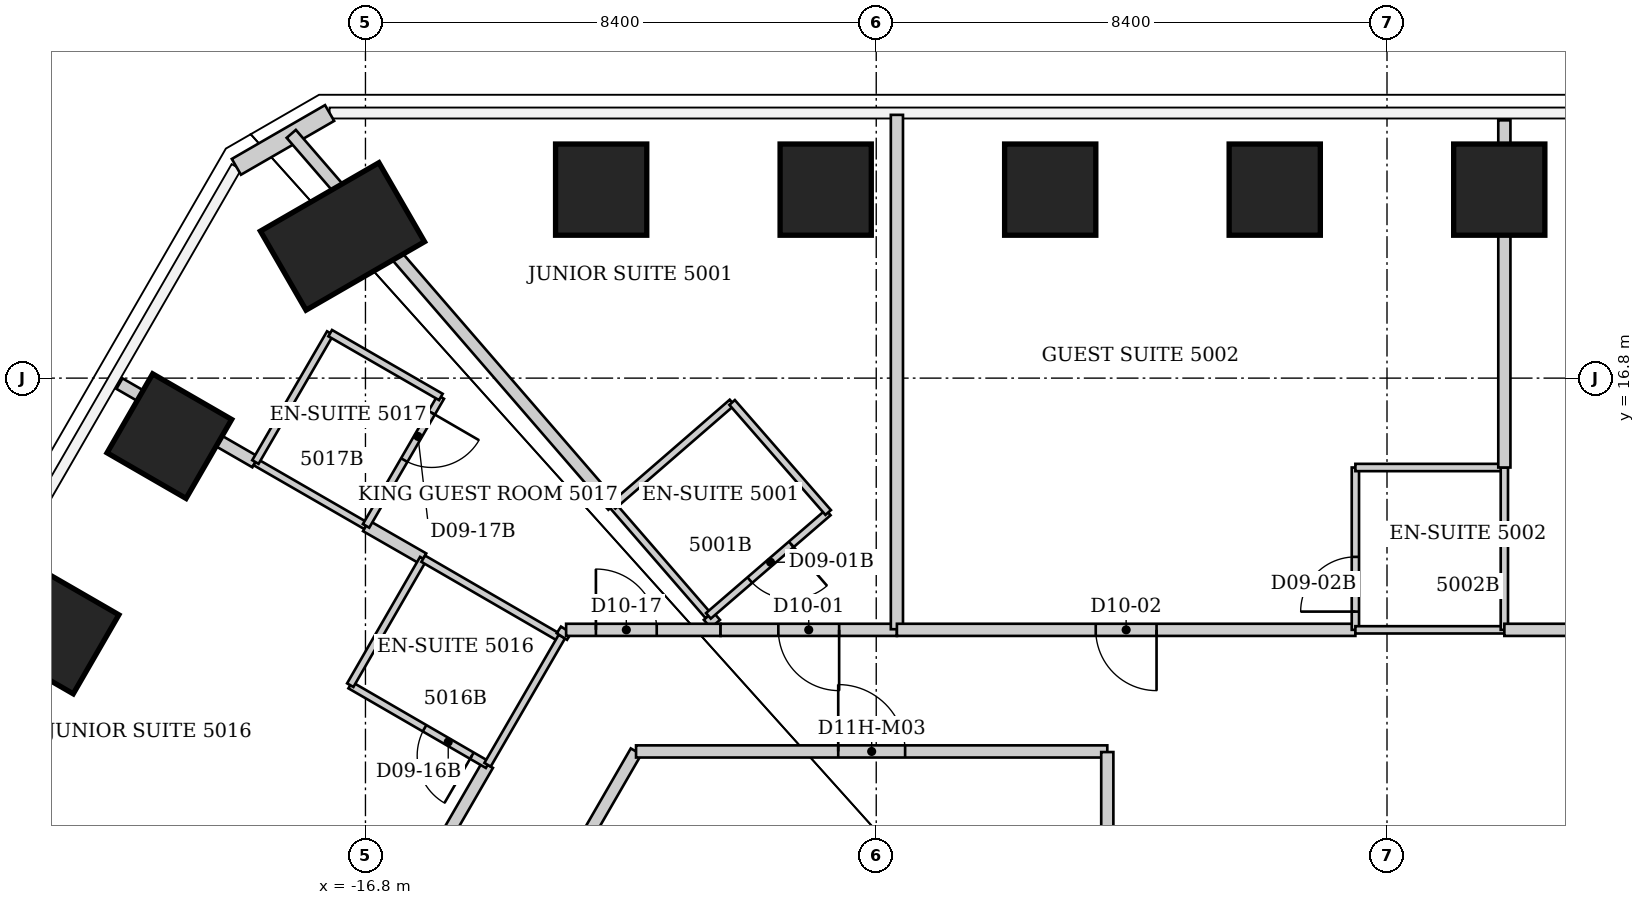
"""IFC4 building model, lengths in metres.
Left out: names, types, materials, properties, quantities, classifications, styles, units other than length and angle.
Written with IfcOpenShell. Run it as: python <this file> out.ifc"""

import sys

from ifc_helpers import new_model, si_unit, direction, frame, frame_2d, origin, origin_2d, place, context, subcontext, project, spatial, rectangle, extrude, element, fill, save


model = new_model("IFC4")
c1 = context("Model", 3, precision=1e-05, world=origin(), true_north=direction((0.0, 1.0)))
c2 = subcontext(c1, "Body", "Model", "MODEL_VIEW")
j1 = project(units=[si_unit("LENGTHUNIT", "METRE"), si_unit("PLANEANGLEUNIT", "RADIAN")], contexts=[c1])
p1 = place(None, origin())
s1 = spatial("IfcSite", under=j1, at=p1, CompositionType="ELEMENT")
p2 = place(p1, origin())
s2 = spatial("IfcBuilding", under=s1, at=p2, CompositionType="ELEMENT")
p3 = place(p2, frame((0.0, 0.0, 202.2)))
s3 = spatial("IfcBuildingStorey", under=s2, at=p3, CompositionType="ELEMENT", Elevation=202.2)
for number, where, z_axis, x_axis in (
    (1, (-12.924, 19.9, 0.0), (0.0, 0.0, 1.0), (0.0, 1.0, 0.0)),
    (2, (-9.231, 19.9, 0.0), (0.0, 0.0, 1.0), (0.0, 1.0, 0.0)),
    (3, (-5.539, 19.9, 0.0), (0.0, 0.0, 1.0), (0.0, 1.0, 0.0)),
    (4, (-1.846, 19.9, 0.0), (0.0, 0.0, 1.0), (0.0, 1.0, 0.0)),
    (5, (1.846, 19.9, 0.0), (0.0, 0.0, 1.0), (0.0, 1.0, 0.0)),
    (6, (-21.88, 12.633, 0.0), (0.0, 0.0, 1.0), (-0.866, 0.5, 0.0)),
    (7, (-20.025, 15.846, 0.0), (0.0, 0.0, 1.0), (-0.866, 0.5, 0.0)),
):
    element("IfcColumn", number, at=place(p3, frame(where, z_axis=z_axis, x_axis=x_axis)), inside=s3, PredefinedType="COLUMN", context=c2, shape_type="SweptSolid", body=[
        extrude(rectangle(XDim=1.5, YDim=1.5, at=origin_2d()), origin(), (0.0, 0.0, 1.0), 3.8),
    ])
p4 = place(p3, frame((-17.178, 19.131, 0.0), z_axis=(0.0, 0.0, 1.0), x_axis=(-0.5, 0.866025403784, 0.0)))
e8 = element("IfcColumn", 8, at=p4, inside=s3, PredefinedType="COLUMN", context=c2, shape_type="SweptSolid", body=[
    extrude(rectangle(XDim=1.5, YDim=2.25, at=origin_2d()), origin(), (0.0, 0.0, 1.0), 3.8),
])
p5 = place(p3, frame((-18.923, 20.275, 0.0), z_axis=(0.0, 0.0, 1.0), x_axis=(0.866036293601, 0.499981137809, 0.0)))
e9 = element("IfcWall", 9, at=p5, inside=s3, PredefinedType="SOLIDWALL", context=c2, shape_type="SweptSolid", body=[
    extrude(rectangle(XDim=1.77, YDim=0.3, at=frame_2d((0.885, 0.0))), origin(), (0.0, 0.0, 1.0), 3.64),
])
p6 = place(p3, frame((-20.846, 16.71, 0.0), z_axis=(0.0, 0.0, 1.0), x_axis=(0.866163541035, -0.499760662899, 0.0)))
e10 = element("IfcWall", 10, at=p6, inside=s3, PredefinedType="PARTITIONING", context=c2, shape_type="SweptSolid", body=[
    extrude(rectangle(XDim=2.581, YDim=0.2, at=frame_2d((1.291, 0.0))), origin(), (0.0, 0.0, 1.0), 3.64),
])
p7 = place(p3, frame((-18.61, 15.42, 0.0), z_axis=(0.0, 0.0, 1.0), x_axis=(0.86618365172, -0.499725806311, 0.0)))
e11 = element("IfcWall", 11, at=p7, inside=s3, PredefinedType="PARTITIONING", context=c2, shape_type="SweptSolid", body=[
    extrude(rectangle(XDim=2.101, YDim=0.12, at=frame_2d((1.051, 0.0))), origin(), (0.0, 0.0, 1.0), 3.64),
])
p8 = place(p3, frame((-18.02, 20.817, 0.0), z_axis=(0.0, 0.0, 1.0), x_axis=(0.654118793629, -0.756391832201, 0.0)))
e12 = element("IfcWall", 12, at=p8, inside=s3, PredefinedType="PARTITIONING", context=c2, shape_type="SweptSolid", body=[
    extrude(rectangle(XDim=8.088, YDim=0.2, at=frame_2d((4.044, 0.0))), origin(), (0.0, 0.0, 1.0), 3.64),
])
p9 = place(p3, frame((-17.64, 5.51, 0.0), z_axis=(0.0, 0.0, 1.0), x_axis=(0.500468304441, 0.865754859212, 0.0)))
e13 = element("IfcWall", 13, at=p9, inside=s3, PredefinedType="PARTITIONING", context=c2, shape_type="SweptSolid", body=[
    extrude(rectangle(XDim=5.694, YDim=0.2, at=frame_2d((2.847, 0.0))), origin(), (0.0, 0.0, 1.0), 3.64),
])
p10 = place(p9, frame((2.347, 0.0, 0.0)))
e14 = element("IfcOpeningElement", 14, at=p10, cuts=e13, PredefinedType="OPENING", context=c2, shape_type="SweptSolid", body=[
    extrude(rectangle(XDim=1.0, YDim=2.13, at=frame_2d((0.5, 1.065))), frame((0.0, 0.1, 0.0), z_axis=(0.0, -1.0, 0.0), x_axis=(1.0, 0.0, 0.0)), (0.0, 0.0, 1.0), 0.2),
])
p11 = place(p3, frame((-17.38, 17.54, 0.0), z_axis=(0.0, 0.0, 1.0), x_axis=(-0.501888006485, -0.864932615264, 0.0)))
e15 = element("IfcWall", 15, at=p11, inside=s3, PredefinedType="PARTITIONING", context=c2, shape_type="SweptSolid", body=[
    extrude(rectangle(XDim=2.451, YDim=0.12, at=frame_2d((1.226, 0.0))), origin(), (0.0, 0.0, 1.0), 3.64),
])
p12 = place(p3, frame((-17.05, 11.75, 0.0), z_axis=(0.0, 0.0, 1.0), x_axis=(0.865155281359, -0.50150407689, 0.0)))
e16 = element("IfcWall", 16, at=p12, inside=s3, PredefinedType="PARTITIONING", context=c2, shape_type="SweptSolid", body=[
    extrude(rectangle(XDim=2.612, YDim=0.12, at=frame_2d((1.306, 0.0))), origin(), (0.0, 0.0, 1.0), 3.64),
])
p13 = place(p12, frame((1.412, 0.0, 0.0)))
e17 = element("IfcOpeningElement", 17, at=p13, cuts=e16, PredefinedType="OPENING", context=c2, shape_type="SweptSolid", body=[
    extrude(rectangle(XDim=0.9, YDim=2.03, at=frame_2d((0.45, 1.015))), frame((0.0, 0.06, 0.0), z_axis=(0.0, -1.0, 0.0), x_axis=(1.0, 0.0, 0.0)), (0.0, 0.0, 1.0), 0.12),
])
p14 = place(p3, frame((-16.79, 14.37, 0.0), z_axis=(0.0, 0.0, 1.0), x_axis=(0.867132442133, -0.498077632303, 0.0)))
e18 = element("IfcWall", 18, at=p14, inside=s3, PredefinedType="PARTITIONING", context=c2, shape_type="SweptSolid", body=[
    extrude(rectangle(XDim=1.084, YDim=0.2, at=frame_2d((0.542, 0.0))), origin(), (0.0, 0.0, 1.0), 3.64),
])
p15 = place(p3, frame((-16.79, 14.37, 0.0), z_axis=(0.0, 0.0, 1.0), x_axis=(0.501856726365, 0.86495076519, 0.0)))
e19 = element("IfcWall", 19, at=p15, inside=s3, PredefinedType="PARTITIONING", context=c2, shape_type="SweptSolid", body=[
    extrude(rectangle(XDim=2.451, YDim=0.12, at=frame_2d((1.226, 0.0))), origin(), (0.0, 0.0, 1.0), 3.64),
])
p16 = place(p15, frame((1.251, 0.0, 0.0)))
e20 = element("IfcOpeningElement", 20, at=p16, cuts=e19, PredefinedType="OPENING", context=c2, shape_type="SweptSolid", body=[
    extrude(rectangle(XDim=0.9, YDim=2.03, at=frame_2d((0.45, 1.015))), frame((0.0, 0.06, 0.0), z_axis=(0.0, -1.0, 0.0), x_axis=(1.0, 0.0, 0.0)), (0.0, 0.0, 1.0), 0.12),
])
p17 = place(p3, frame((-15.85, 13.83, 0.0), z_axis=(0.0, 0.0, 1.0), x_axis=(-0.499693115345, -0.866202511239, 0.0)))
e21 = element("IfcWall", 21, at=p17, inside=s3, PredefinedType="PARTITIONING", context=c2, shape_type="SweptSolid", body=[
    extrude(rectangle(XDim=2.401, YDim=0.12, at=frame_2d((1.201, 0.0))), origin(), (0.0, 0.0, 1.0), 3.64),
])
p18 = place(p3, frame((-15.85, 13.83, 0.0), z_axis=(0.0, 0.0, 1.0), x_axis=(0.865155281359, -0.50150407689, 0.0)))
e22 = element("IfcWall", 22, at=p18, inside=s3, PredefinedType="PARTITIONING", context=c2, shape_type="SweptSolid", body=[
    extrude(rectangle(XDim=2.612, YDim=0.12, at=frame_2d((1.306, 0.0))), origin(), (0.0, 0.0, 1.0), 3.64),
])
p19 = place(p3, frame((-15.56, 16.49, 0.0), z_axis=(0.0, 0.0, 1.0), x_axis=(-0.86618365172, 0.499725806311, 0.0)))
e23 = element("IfcWall", 23, at=p19, inside=s3, PredefinedType="PARTITIONING", context=c2, shape_type="SweptSolid", body=[
    extrude(rectangle(XDim=2.101, YDim=0.12, at=frame_2d((1.051, 0.0))), origin(), (0.0, 0.0, 1.0), 3.64),
])
p20 = place(p3, frame((-14.99, 6.09, 0.0), z_axis=(0.0, 0.0, 1.0), x_axis=(0.500213626659, 0.86590203124, 0.0)))
e24 = element("IfcWall", 24, at=p20, inside=s3, PredefinedType="PARTITIONING", context=c2, shape_type="SweptSolid", body=[
    extrude(rectangle(XDim=5.278, YDim=0.2, at=frame_2d((2.639, 0.0))), origin(), (0.0, 0.0, 1.0), 3.64),
])
p21 = place(p3, frame((-14.792, 10.441, 0.0), z_axis=(0.0, 0.0, 1.0), x_axis=(0.501340276177, 0.865250210912, 0.0)))
e25 = element("IfcWall", 25, at=p21, inside=s3, PredefinedType="PARTITIONING", context=c2, shape_type="SweptSolid", body=[
    extrude(rectangle(XDim=2.437, YDim=0.12, at=frame_2d((1.219, 0.0))), origin(), (0.0, 0.0, 1.0), 3.64),
])
p22 = place(p3, frame((-13.5, 12.66, 0.0), z_axis=(0.0, 0.0, 1.0), x_axis=(-0.537723852201, -0.843121022614, 0.0)))
e26 = element("IfcWall", 26, at=p22, inside=s3, PredefinedType="PARTITIONING", context=c2, shape_type="SweptSolid", body=[
    extrude(rectangle(XDim=0.13, YDim=0.2, at=frame_2d((0.065, 0.0))), origin(), (0.0, 0.0, 1.0), 3.64),
])
p23 = place(p3, frame((-12.73, 14.7, 0.0), z_axis=(0.0, 0.0, 1.0), x_axis=(0.655302876176, -0.755366229372, 0.0)))
e27 = element("IfcWall", 27, at=p23, inside=s3, PredefinedType="PARTITIONING", context=c2, shape_type="SweptSolid", body=[
    extrude(rectangle(XDim=2.396, YDim=0.12, at=frame_2d((1.198, 0.0))), origin(), (0.0, 0.0, 1.0), 3.64),
])
p24 = place(p3, frame((-12.35, 10.66, 0.0), z_axis=(0.0, 0.0, 1.0), x_axis=(1.0, 0.0, 0.0)))
e28 = element("IfcWall", 28, at=p24, inside=s3, PredefinedType="PARTITIONING", context=c2, shape_type="SweptSolid", body=[
    extrude(rectangle(XDim=7.75, YDim=0.2, at=frame_2d((3.875, 0.0))), origin(), (0.0, 0.0, 1.0), 3.64),
])
p25 = place(p24, frame((3.325, 0.0, 0.0)))
e29 = element("IfcOpeningElement", 29, at=p25, cuts=e28, PredefinedType="OPENING", context=c2, shape_type="SweptSolid", body=[
    extrude(rectangle(XDim=1.1, YDim=2.2, at=frame_2d((0.55, 1.1))), frame((0.0, 0.1, 0.0), z_axis=(0.0, -1.0, 0.0), x_axis=(1.0, 0.0, 0.0)), (0.0, 0.0, 1.0), 0.2),
])
p26 = place(p3, frame((-11.16, 12.89, 0.0), z_axis=(0.0, 0.0, 1.0), x_axis=(0.655728604214, -0.754996687155, 0.0)))
e30 = element("IfcWall", 30, at=p26, inside=s3, PredefinedType="PARTITIONING", context=c2, shape_type="SweptSolid", body=[
    extrude(rectangle(XDim=0.175, YDim=0.2, at=frame_2d((0.087, 0.0))), origin(), (0.0, 0.0, 1.0), 3.64),
])
p27 = place(p3, frame((-11.16, 12.89, 0.0), z_axis=(0.0, 0.0, 1.0), x_axis=(0.757040252764, 0.65336823897, 0.0)))
e31 = element("IfcWall", 31, at=p27, inside=s3, PredefinedType="PARTITIONING", context=c2, shape_type="SweptSolid", body=[
    extrude(rectangle(XDim=2.602, YDim=0.12, at=frame_2d((1.301, 0.0))), origin(), (0.0, 0.0, 1.0), 3.64),
])
p28 = place(p27, frame((0.9, 0.0, 0.0)))
e32 = element("IfcOpeningElement", 32, at=p28, cuts=e31, PredefinedType="OPENING", context=c2, shape_type="SweptSolid", body=[
    extrude(rectangle(XDim=0.9, YDim=2.03, at=frame_2d((0.45, 1.015))), frame((0.0, 0.06, 0.0), z_axis=(0.0, -1.0, 0.0), x_axis=(1.0, 0.0, 0.0)), (0.0, 0.0, 1.0), 0.12),
])
p29 = place(p3, frame((-10.96, 12.66, 0.0), z_axis=(0.0, 0.0, 1.0), x_axis=(-1.0, 0.0, 0.0)))
e33 = element("IfcWall", 33, at=p29, inside=s3, PredefinedType="PARTITIONING", context=c2, shape_type="SweptSolid", body=[
    extrude(rectangle(XDim=2.54, YDim=0.2, at=frame_2d((1.27, 0.0))), origin(), (0.0, 0.0, 1.0), 3.64),
])
p30 = place(p29, frame((1.05, 0.0, 0.0)))
e34 = element("IfcOpeningElement", 34, at=p30, cuts=e33, PredefinedType="OPENING", context=c2, shape_type="SweptSolid", body=[
    extrude(rectangle(XDim=1.0, YDim=2.13, at=frame_2d((0.5, 1.065))), frame((0.0, 0.1, 0.0), z_axis=(0.0, -1.0, 0.0), x_axis=(1.0, 0.0, 0.0)), (0.0, 0.0, 1.0), 0.2),
])
p31 = place(p3, frame((-10.77, 16.4, 0.0), z_axis=(0.0, 0.0, 1.0), x_axis=(-0.755437535555, -0.655220672655, 0.0)))
e35 = element("IfcWall", 35, at=p31, inside=s3, PredefinedType="PARTITIONING", context=c2, shape_type="SweptSolid", body=[
    extrude(rectangle(XDim=2.594, YDim=0.12, at=frame_2d((1.297, 0.0))), origin(), (0.0, 0.0, 1.0), 3.64),
])
p32 = place(p3, frame((-9.19, 14.59, 0.0), z_axis=(0.0, 0.0, 1.0), x_axis=(-0.65767687105, 0.75330016148, 0.0)))
e36 = element("IfcWall", 36, at=p32, inside=s3, PredefinedType="PARTITIONING", context=c2, shape_type="SweptSolid", body=[
    extrude(rectangle(XDim=2.403, YDim=0.12, at=frame_2d((1.201, 0.0))), origin(), (0.0, 0.0, 1.0), 3.64),
])
p33 = place(p3, frame((-8.06, 12.66, 0.0), z_axis=(0.0, 0.0, 1.0), x_axis=(-1.0, 0.0, 0.0)))
e37 = element("IfcWall", 37, at=p33, inside=s3, PredefinedType="PARTITIONING", context=c2, shape_type="SweptSolid", body=[
    extrude(rectangle(XDim=2.9, YDim=0.2, at=frame_2d((1.45, 0.0))), origin(), (0.0, 0.0, 1.0), 3.64),
])
p34 = place(p33, frame((0.95, 0.0, 0.0)))
e38 = element("IfcOpeningElement", 38, at=p34, cuts=e37, PredefinedType="OPENING", context=c2, shape_type="SweptSolid", body=[
    extrude(rectangle(XDim=1.0, YDim=2.13, at=frame_2d((0.5, 1.065))), frame((0.0, 0.1, 0.0), z_axis=(0.0, -1.0, 0.0), x_axis=(1.0, 0.0, 0.0)), (0.0, 0.0, 1.0), 0.2),
])
p35 = place(p3, frame((-8.06, 21.13, 0.0), z_axis=(0.0, 0.0, 1.0), x_axis=(0.0, -1.0, 0.0)))
e39 = element("IfcWall", 39, at=p35, inside=s3, PredefinedType="PARTITIONING", context=c2, shape_type="SweptSolid", body=[
    extrude(rectangle(XDim=8.46, YDim=0.2, at=frame_2d((4.23, 0.0))), origin(), (0.0, 0.0, 1.0), 3.64),
])
p36 = place(p3, frame((-4.6, 10.65, 0.0), z_axis=(0.0, 0.0, 1.0), x_axis=(0.0, -1.0, 0.0)))
e40 = element("IfcWall", 40, at=p36, inside=s3, PredefinedType="PARTITIONING", context=c2, shape_type="SweptSolid", body=[
    extrude(rectangle(XDim=1.74, YDim=0.2, at=frame_2d((0.87, 0.0))), origin(), (0.0, 0.0, 1.0), 3.64),
])
p37 = place(p3, frame((-0.52, 12.66, 0.0), z_axis=(0.0, 0.0, 1.0), x_axis=(-1.0, 0.0, 0.0)))
e41 = element("IfcWall", 41, at=p37, inside=s3, PredefinedType="PARTITIONING", context=c2, shape_type="SweptSolid", body=[
    extrude(rectangle(XDim=7.54, YDim=0.2, at=frame_2d((3.77, 0.0))), origin(), (0.0, 0.0, 1.0), 3.64),
])
p38 = place(p37, frame((3.27, 0.0, 0.0)))
e42 = element("IfcOpeningElement", 42, at=p38, cuts=e41, PredefinedType="OPENING", context=c2, shape_type="SweptSolid", body=[
    extrude(rectangle(XDim=1.0, YDim=2.13, at=frame_2d((0.5, 1.065))), frame((0.0, 0.1, 0.0), z_axis=(0.0, -1.0, 0.0), x_axis=(1.0, 0.0, 0.0)), (0.0, 0.0, 1.0), 0.2),
])
p39 = place(p3, frame((-0.52, 15.33, 0.0), z_axis=(0.0, 0.0, 1.0), x_axis=(0.0, -1.0, 0.0)))
e43 = element("IfcWall", 43, at=p39, inside=s3, PredefinedType="PARTITIONING", context=c2, shape_type="SweptSolid", body=[
    extrude(rectangle(XDim=2.67, YDim=0.12, at=frame_2d((1.335, 0.0))), origin(), (0.0, 0.0, 1.0), 3.64),
])
p40 = place(p39, frame((1.47, 0.0, 0.0)))
e44 = element("IfcOpeningElement", 44, at=p40, cuts=e43, PredefinedType="OPENING", context=c2, shape_type="SweptSolid", body=[
    extrude(rectangle(XDim=0.9, YDim=2.03, at=frame_2d((0.45, 1.015))), frame((0.0, 0.06, 0.0), z_axis=(0.0, -1.0, 0.0), x_axis=(1.0, 0.0, 0.0)), (0.0, 0.0, 1.0), 0.12),
])
for number, where, z_axis, x_axis in (
    (45, (1.93, 12.66, 0.0), (0.0, 0.0, 1.0), (-1.0, 0.0, 0.0)),
    (46, (1.93, 15.33, 0.0), (0.0, 0.0, 1.0), (-1.0, 0.0, 0.0)),
):
    element("IfcWall", number, at=place(p3, frame(where, z_axis=z_axis, x_axis=x_axis)), inside=s3, PredefinedType="PARTITIONING", context=c2, shape_type="SweptSolid", body=[
        extrude(rectangle(XDim=2.45, YDim=0.12, at=frame_2d((1.225, 0.0))), origin(), (0.0, 0.0, 1.0), 3.64),
    ])
p41 = place(p3, frame((1.93, 15.33, 0.0), z_axis=(0.0, 0.0, 1.0), x_axis=(0.0, -1.0, 0.0)))
e47 = element("IfcWall", 47, at=p41, inside=s3, PredefinedType="PARTITIONING", context=c2, shape_type="SweptSolid", body=[
    extrude(rectangle(XDim=2.67, YDim=0.12, at=frame_2d((1.335, 0.0))), origin(), (0.0, 0.0, 1.0), 3.023),
])
p42 = place(p3, frame((1.93, 21.04, 0.0), z_axis=(0.0, 0.0, 1.0), x_axis=(0.0, -1.0, 0.0)))
e48 = element("IfcWall", 48, at=p42, inside=s3, PredefinedType="PARTITIONING", context=c2, shape_type="SweptSolid", body=[
    extrude(rectangle(XDim=5.71, YDim=0.2, at=frame_2d((2.855, 0.0))), origin(), (0.0, 0.0, 1.0), 3.023),
])
p43 = place(p3, frame((8.53, 12.66, 0.0), z_axis=(0.0, 0.0, 1.0), x_axis=(-1.0, 0.0, 0.0)))
e49 = element("IfcWall", 49, at=p43, inside=s3, PredefinedType="PARTITIONING", context=c2, shape_type="SweptSolid", body=[
    extrude(rectangle(XDim=6.6, YDim=0.2, at=frame_2d((3.3, 0.0))), origin(), (0.0, 0.0, 1.0), 3.64),
])
p44 = place(p43, frame((2.8, 0.0, 0.0)))
e50 = element("IfcOpeningElement", 50, at=p44, cuts=e49, PredefinedType="OPENING", context=c2, shape_type="SweptSolid", body=[
    extrude(rectangle(XDim=1.0, YDim=2.13, at=frame_2d((0.5, 1.065))), frame((0.0, 0.1, 0.0), z_axis=(0.0, -1.0, 0.0), x_axis=(1.0, 0.0, 0.0)), (0.0, 0.0, 1.0), 0.2),
])
p45 = place(p34, origin())
e51 = element("IfcDoor", 51, at=p45, inside=s3, OperationType="SINGLE_SWING_LEFT", PredefinedType="DOOR", context=c2, shape_type="SweptSolid", body=[
    extrude(rectangle(XDim=1.0, YDim=2.13, at=frame_2d((0.5, 1.065))), frame((0.0, 0.025, 0.0), z_axis=(0.0, -1.0, 0.0), x_axis=(1.0, 0.0, 0.0)), (0.0, 0.0, 1.0), 0.05),
])
fill(e38, e51)
p46 = place(p28, origin())
e52 = element("IfcDoor", 52, at=p46, inside=s3, OperationType="SINGLE_SWING_RIGHT", PredefinedType="DOOR", context=c2, shape_type="SweptSolid", body=[
    extrude(rectangle(XDim=0.9, YDim=2.03, at=frame_2d((0.45, 1.015))), frame((0.0, 0.025, 0.0), z_axis=(0.0, -1.0, 0.0), x_axis=(1.0, 0.0, 0.0)), (0.0, 0.0, 1.0), 0.05),
])
fill(e32, e52)
p47 = place(p38, origin())
e53 = element("IfcDoor", 53, at=p47, inside=s3, OperationType="SINGLE_SWING_LEFT", PredefinedType="DOOR", context=c2, shape_type="SweptSolid", body=[
    extrude(rectangle(XDim=1.0, YDim=2.13, at=frame_2d((0.5, 1.065))), frame((0.0, 0.025, 0.0), z_axis=(0.0, -1.0, 0.0), x_axis=(1.0, 0.0, 0.0)), (0.0, 0.0, 1.0), 0.05),
])
fill(e42, e53)
p48 = place(p40, origin())
e54 = element("IfcDoor", 54, at=p48, inside=s3, OperationType="SINGLE_SWING_RIGHT", PredefinedType="DOOR", context=c2, shape_type="SweptSolid", body=[
    extrude(rectangle(XDim=0.9, YDim=2.03, at=frame_2d((0.45, 1.015))), frame((0.0, 0.025, 0.0), z_axis=(0.0, -1.0, 0.0), x_axis=(1.0, 0.0, 0.0)), (0.0, 0.0, 1.0), 0.05),
])
fill(e44, e54)
p49 = place(p13, origin())
e55 = element("IfcDoor", 55, at=p49, inside=s3, OperationType="SINGLE_SWING_RIGHT", PredefinedType="DOOR", context=c2, shape_type="SweptSolid", body=[
    extrude(rectangle(XDim=0.9, YDim=2.03, at=frame_2d((0.45, 1.015))), frame((0.0, 0.025, 0.0), z_axis=(0.0, -1.0, 0.0), x_axis=(1.0, 0.0, 0.0)), (0.0, 0.0, 1.0), 0.05),
])
fill(e17, e55)
p50 = place(p30, origin())
e56 = element("IfcDoor", 56, at=p50, inside=s3, OperationType="SINGLE_SWING_RIGHT", PredefinedType="DOOR", context=c2, shape_type="SweptSolid", body=[
    extrude(rectangle(XDim=1.0, YDim=2.13, at=frame_2d((0.5, 1.065))), frame((0.0, 0.025, 0.0), z_axis=(0.0, -1.0, 0.0), x_axis=(1.0, 0.0, 0.0)), (0.0, 0.0, 1.0), 0.05),
])
fill(e34, e56)
p51 = place(p16, origin())
e57 = element("IfcDoor", 57, at=p51, inside=s3, OperationType="SINGLE_SWING_RIGHT", PredefinedType="DOOR", context=c2, shape_type="SweptSolid", body=[
    extrude(rectangle(XDim=0.9, YDim=2.03, at=frame_2d((0.45, 1.015))), frame((0.0, 0.025, 0.0), z_axis=(0.0, -1.0, 0.0), x_axis=(1.0, 0.0, 0.0)), (0.0, 0.0, 1.0), 0.05),
])
fill(e20, e57)
p52 = place(p25, origin())
e58 = element("IfcDoor", 58, at=p52, inside=s3, OperationType="SINGLE_SWING_LEFT", PredefinedType="DOOR", context=c2, shape_type="SweptSolid", body=[
    extrude(rectangle(XDim=1.1, YDim=2.2, at=frame_2d((0.55, 1.1))), frame((0.0, 0.025, 0.0), z_axis=(0.0, -1.0, 0.0), x_axis=(1.0, 0.0, 0.0)), (0.0, 0.0, 1.0), 0.05),
])
fill(e29, e58)
save(model, sys.argv[1])
